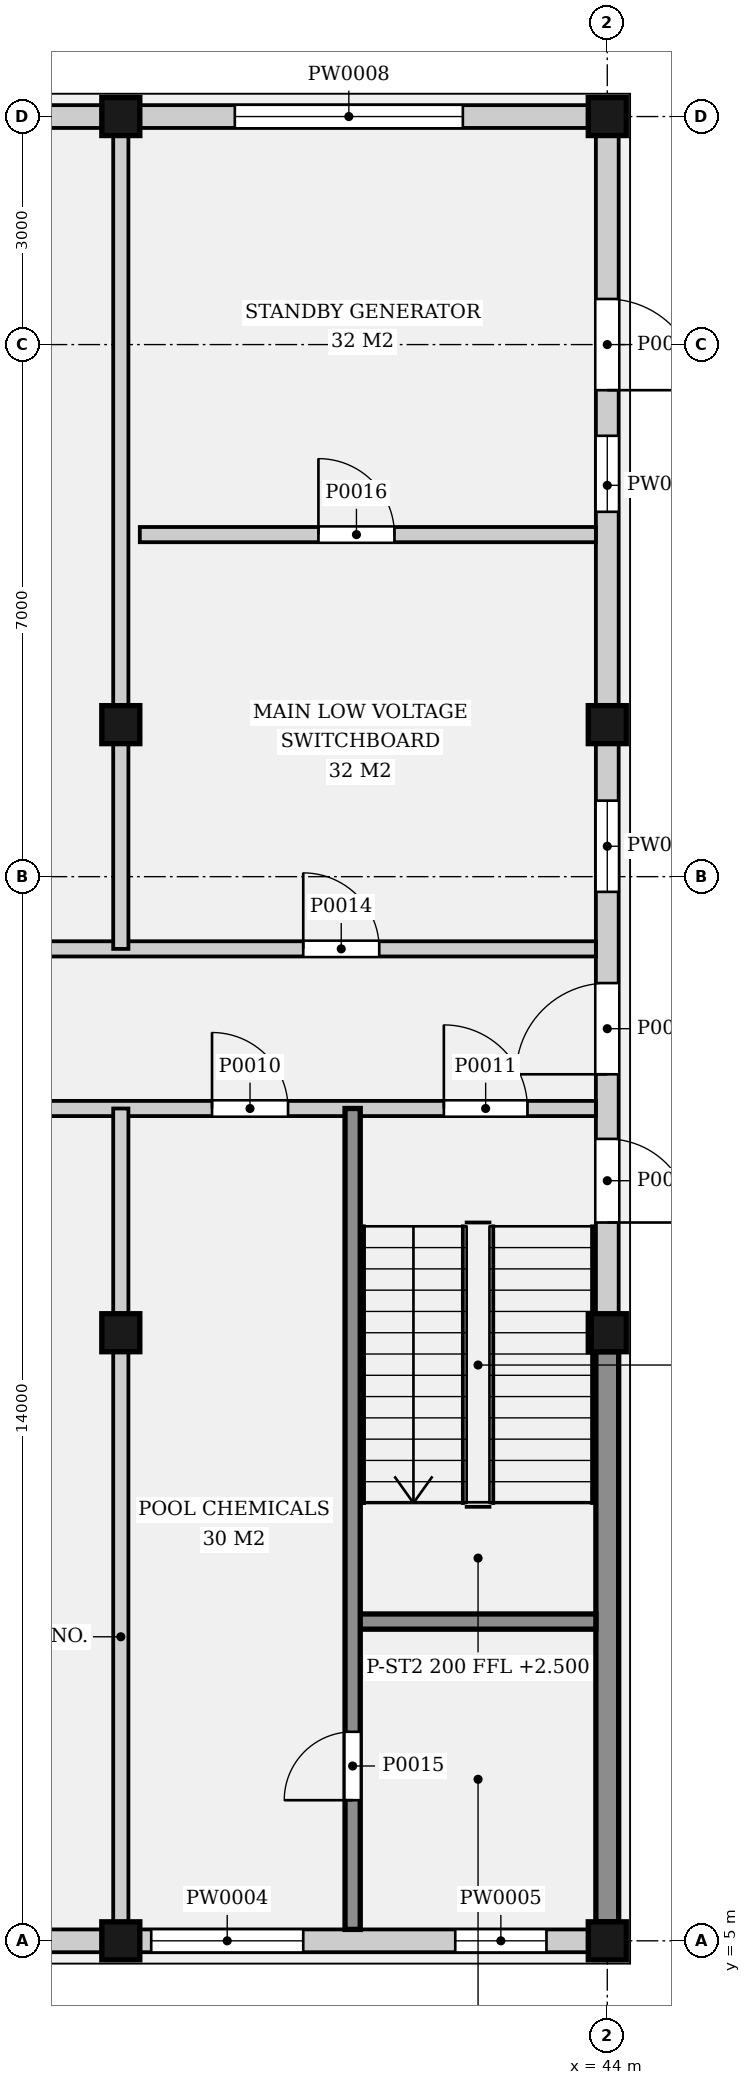
"""IFC4 building model, lengths in metres.
Left out: names, types, materials, properties, quantities, classifications, styles, units other than length and angle.
Written with IfcOpenShell. Run it as: python <this file> out.ifc"""

import sys

from ifc_helpers import new_model, si_unit, direction, frame, frame_2d, origin, origin_2d, place, context, subcontext, project, spatial, rectangle, extrude, element, fill, save


model = new_model("IFC4")
c1 = context("Model", 3, precision=1e-05, world=origin(), true_north=direction((0.0, 1.0)))
c2 = subcontext(c1, "Body", "Model", "MODEL_VIEW")
j1 = project(units=[si_unit("LENGTHUNIT", "METRE"), si_unit("PLANEANGLEUNIT", "RADIAN")], contexts=[c1])
p1 = place(None, origin())
s1 = spatial("IfcSite", under=j1, at=p1, CompositionType="ELEMENT")
p2 = place(p1, origin())
s2 = spatial("IfcBuilding", under=s1, at=p2, CompositionType="ELEMENT")
p3 = place(p2, origin())
s3 = spatial("IfcBuildingStorey", under=s2, at=p3, CompositionType="ELEMENT", Elevation=0.0)
for number, where, z_axis, x_axis in (
    (1, (37.6, 5.0, -0.25), (0.0, 0.0, 1.0), (1.0, 0.0, 0.0)),
    (2, (37.6, 13.0, -0.25), (0.0, 0.0, 1.0), (1.0, 0.0, 0.0)),
    (3, (37.6, 21.0, -0.25), (0.0, 0.0, 1.0), (1.0, 0.0, 0.0)),
    (4, (37.6, 29.0, -0.25), (0.0, 0.0, 1.0), (1.0, 0.0, 0.0)),
    (5, (44.0, 5.0, -0.25), (0.0, 0.0, 1.0), (1.0, 0.0, 0.0)),
    (6, (44.0, 13.0, -0.25), (0.0, 0.0, 1.0), (1.0, 0.0, 0.0)),
    (7, (44.0, 21.0, -0.25), (0.0, 0.0, 1.0), (1.0, 0.0, 0.0)),
    (8, (44.0, 29.0, -0.25), (0.0, 0.0, 1.0), (1.0, 0.0, 0.0)),
):
    element("IfcColumn", number, at=place(p3, frame(where, z_axis=z_axis, x_axis=x_axis)), inside=s3, PredefinedType="COLUMN", context=c2, shape_type="SweptSolid", body=[
        extrude(rectangle(XDim=0.5, YDim=0.5, at=origin_2d()), origin(), (0.0, 0.0, 1.0), 5.25),
    ])
p4 = place(p3, frame((31.45, 5.0, 0.0), z_axis=(0.0, 0.0, 1.0), x_axis=(1.0, 0.0, 0.0)))
e9 = element("IfcWall", 9, at=p4, inside=s3, PredefinedType="SOLIDWALL", context=c2, shape_type="SweptSolid", body=[
    extrude(rectangle(XDim=5.9, YDim=0.3, at=frame_2d((2.95, 0.0))), origin(), (0.0, 0.0, 1.0), 4.64),
])
p5 = place(p4, frame((1.25, 0.0, 0.6)))
e10 = element("IfcOpeningElement", 10, at=p5, cuts=e9, PredefinedType="OPENING", context=c2, shape_type="SweptSolid", body=[
    extrude(rectangle(XDim=3.4, YDim=2.8, at=frame_2d((1.7, 1.4))), frame((0.0, 0.16, 0.0), z_axis=(0.0, -1.0, 0.0), x_axis=(1.0, 0.0, 0.0)), (0.0, 0.0, 1.0), 0.32),
])
p6 = place(p3, frame((37.85, 5.0, 0.0), z_axis=(0.0, 0.0, 1.0), x_axis=(1.0, 0.0, 0.0)))
e11 = element("IfcWall", 11, at=p6, inside=s3, PredefinedType="SOLIDWALL", context=c2, shape_type="SweptSolid", body=[
    extrude(rectangle(XDim=5.9, YDim=0.3, at=frame_2d((2.95, 0.0))), origin(), (0.0, 0.0, 1.0), 4.64),
])
p7 = place(p6, frame((0.15, 0.0, 0.9)))
e12 = element("IfcOpeningElement", 12, at=p7, cuts=e11, PredefinedType="OPENING", context=c2, shape_type="SweptSolid", body=[
    extrude(rectangle(XDim=2.0, YDim=2.4, at=frame_2d((1.0, 1.2))), frame((0.0, 0.16, 0.0), z_axis=(0.0, -1.0, 0.0), x_axis=(1.0, 0.0, 0.0)), (0.0, 0.0, 1.0), 0.32),
])
p8 = place(p6, frame((4.15, 0.0, 0.9)))
e13 = element("IfcOpeningElement", 13, at=p8, cuts=e11, PredefinedType="OPENING", context=c2, shape_type="SweptSolid", body=[
    extrude(rectangle(XDim=1.2, YDim=2.4, at=frame_2d((0.6, 1.2))), frame((0.0, 0.16, 0.0), z_axis=(0.0, -1.0, 0.0), x_axis=(1.0, 0.0, 0.0)), (0.0, 0.0, 1.0), 0.32),
])
p9 = place(p3, frame((31.45, 29.0, 0.0), z_axis=(0.0, 0.0, 1.0), x_axis=(1.0, 0.0, 0.0)))
e14 = element("IfcWall", 14, at=p9, inside=s3, PredefinedType="SOLIDWALL", context=c2, shape_type="SweptSolid", body=[
    extrude(rectangle(XDim=5.9, YDim=0.3, at=frame_2d((2.95, 0.0))), origin(), (0.0, 0.0, 1.0), 4.64),
])
p10 = place(p9, frame((1.25, 0.0, 0.6)))
e15 = element("IfcOpeningElement", 15, at=p10, cuts=e14, PredefinedType="OPENING", context=c2, shape_type="SweptSolid", body=[
    extrude(rectangle(XDim=3.4, YDim=2.8, at=frame_2d((1.7, 1.4))), frame((0.0, 0.16, 0.0), z_axis=(0.0, -1.0, 0.0), x_axis=(1.0, 0.0, 0.0)), (0.0, 0.0, 1.0), 0.32),
])
p11 = place(p3, frame((37.85, 29.0, 0.0), z_axis=(0.0, 0.0, 1.0), x_axis=(1.0, 0.0, 0.0)))
e16 = element("IfcWall", 16, at=p11, inside=s3, PredefinedType="SOLIDWALL", context=c2, shape_type="SweptSolid", body=[
    extrude(rectangle(XDim=5.9, YDim=0.3, at=frame_2d((2.95, 0.0))), origin(), (0.0, 0.0, 1.0), 4.64),
])
p12 = place(p11, frame((1.25, 0.0, 0.6)))
e17 = element("IfcOpeningElement", 17, at=p12, cuts=e16, PredefinedType="OPENING", context=c2, shape_type="SweptSolid", body=[
    extrude(rectangle(XDim=3.0, YDim=2.8, at=frame_2d((1.5, 1.4))), frame((0.0, 0.16, 0.0), z_axis=(0.0, -1.0, 0.0), x_axis=(1.0, 0.0, 0.0)), (0.0, 0.0, 1.0), 0.32),
])
p13 = place(p3, frame((44.0, 5.25, 0.0), z_axis=(0.0, 0.0, 1.0), x_axis=(0.0, 1.0, 0.0)))
e18 = element("IfcWall", 18, at=p13, inside=s3, PredefinedType="SOLIDWALL", context=c2, shape_type="SweptSolid", body=[
    extrude(rectangle(XDim=7.5, YDim=0.3, at=frame_2d((3.75, 0.0))), origin(), (0.0, 0.0, 1.0), 4.64),
])
p14 = place(p3, frame((44.0, 13.25, 0.0), z_axis=(0.0, 0.0, 1.0), x_axis=(0.0, 1.0, 0.0)))
e19 = element("IfcWall", 19, at=p14, inside=s3, PredefinedType="SOLIDWALL", context=c2, shape_type="SweptSolid", body=[
    extrude(rectangle(XDim=7.5, YDim=0.3, at=frame_2d((3.75, 0.0))), origin(), (0.0, 0.0, 1.0), 4.64),
])
p15 = place(p14, frame((3.15, 0.0, 0.0)))
e20 = element("IfcOpeningElement", 20, at=p15, cuts=e19, PredefinedType="OPENING", context=c2, shape_type="SweptSolid", body=[
    extrude(rectangle(XDim=1.2, YDim=2.1, at=frame_2d((0.6, 1.05))), frame((0.0, 0.16, 0.0), z_axis=(0.0, -1.0, 0.0), x_axis=(1.0, 0.0, 0.0)), (0.0, 0.0, 1.0), 0.32),
])
p16 = place(p14, frame((2.3, 0.0, 0.0), z_axis=(0.0, 0.0, 1.0), x_axis=(-1.0, 0.0, 0.0)))
e21 = element("IfcOpeningElement", 21, at=p16, cuts=e19, PredefinedType="OPENING", context=c2, shape_type="SweptSolid", body=[
    extrude(rectangle(XDim=1.1, YDim=2.1, at=frame_2d((0.55, 1.05))), frame((0.0, 0.16, 0.0), z_axis=(0.0, -1.0, 0.0), x_axis=(1.0, 0.0, 0.0)), (0.0, 0.0, 1.0), 0.32),
])
p17 = place(p14, frame((5.55, 0.0, 0.9)))
e22 = element("IfcOpeningElement", 22, at=p17, cuts=e19, PredefinedType="OPENING", context=c2, shape_type="SweptSolid", body=[
    extrude(rectangle(XDim=1.2, YDim=2.4, at=frame_2d((0.6, 1.2))), frame((0.0, 0.16, 0.0), z_axis=(0.0, -1.0, 0.0), x_axis=(1.0, 0.0, 0.0)), (0.0, 0.0, 1.0), 0.32),
])
p18 = place(p3, frame((44.0, 21.25, 0.0), z_axis=(0.0, 0.0, 1.0), x_axis=(0.0, 1.0, 0.0)))
e23 = element("IfcWall", 23, at=p18, inside=s3, PredefinedType="SOLIDWALL", context=c2, shape_type="SweptSolid", body=[
    extrude(rectangle(XDim=7.5, YDim=0.3, at=frame_2d((3.75, 0.0))), origin(), (0.0, 0.0, 1.0), 4.64),
])
p19 = place(p18, frame((5.35, 0.0, 0.0), z_axis=(0.0, 0.0, 1.0), x_axis=(-1.0, 0.0, 0.0)))
e24 = element("IfcOpeningElement", 24, at=p19, cuts=e23, PredefinedType="OPENING", context=c2, shape_type="SweptSolid", body=[
    extrude(rectangle(XDim=1.2, YDim=2.4, at=frame_2d((0.6, 1.2))), frame((0.0, 0.16, 0.0), z_axis=(0.0, -1.0, 0.0), x_axis=(1.0, 0.0, 0.0)), (0.0, 0.0, 1.0), 0.32),
])
p20 = place(p18, frame((2.55, 0.0, 0.9)))
e25 = element("IfcOpeningElement", 25, at=p20, cuts=e23, PredefinedType="OPENING", context=c2, shape_type="SweptSolid", body=[
    extrude(rectangle(XDim=1.0, YDim=2.4, at=frame_2d((0.5, 1.2))), frame((0.0, 0.16, 0.0), z_axis=(0.0, -1.0, 0.0), x_axis=(1.0, 0.0, 0.0)), (0.0, 0.0, 1.0), 0.32),
])
p21 = place(p3, frame((12.15, 15.95, 0.0), z_axis=(0.0, 0.0, 1.0), x_axis=(1.0, 0.0, 0.0)))
e26 = element("IfcWall", 26, at=p21, inside=s3, PredefinedType="PARTITIONING", context=c2, shape_type="SweptSolid", body=[
    extrude(rectangle(XDim=31.7, YDim=0.2, at=frame_2d((15.85, 0.0))), origin(), (0.0, 0.0, 1.0), 4.64),
])
p22 = place(p21, frame((0.9, 0.0, 0.0)))
e27 = element("IfcOpeningElement", 27, at=p22, cuts=e26, PredefinedType="OPENING", context=c2, shape_type="SweptSolid", body=[
    extrude(rectangle(XDim=0.9, YDim=2.1, at=frame_2d((0.45, 1.05))), frame((0.0, 0.11, 0.0), z_axis=(0.0, -1.0, 0.0), x_axis=(1.0, 0.0, 0.0)), (0.0, 0.0, 1.0), 0.22),
])
p23 = place(p21, frame((6.85, 0.0, 0.0)))
e28 = element("IfcOpeningElement", 28, at=p23, cuts=e26, PredefinedType="OPENING", context=c2, shape_type="SweptSolid", body=[
    extrude(rectangle(XDim=1.0, YDim=2.1, at=frame_2d((0.5, 1.05))), frame((0.0, 0.11, 0.0), z_axis=(0.0, -1.0, 0.0), x_axis=(1.0, 0.0, 0.0)), (0.0, 0.0, 1.0), 0.22),
])
p24 = place(p21, frame((17.95, 0.0, 0.0)))
e29 = element("IfcOpeningElement", 29, at=p24, cuts=e26, PredefinedType="OPENING", context=c2, shape_type="SweptSolid", body=[
    extrude(rectangle(XDim=1.8, YDim=2.4, at=frame_2d((0.9, 1.2))), frame((0.0, 0.11, 0.0), z_axis=(0.0, -1.0, 0.0), x_axis=(1.0, 0.0, 0.0)), (0.0, 0.0, 1.0), 0.22),
])
p25 = place(p21, frame((26.65, 0.0, 0.0)))
e30 = element("IfcOpeningElement", 30, at=p25, cuts=e26, PredefinedType="OPENING", context=c2, shape_type="SweptSolid", body=[
    extrude(rectangle(XDim=1.0, YDim=2.1, at=frame_2d((0.5, 1.05))), frame((0.0, 0.11, 0.0), z_axis=(0.0, -1.0, 0.0), x_axis=(1.0, 0.0, 0.0)), (0.0, 0.0, 1.0), 0.22),
])
p26 = place(p21, frame((29.7, 0.0, 0.0)))
e31 = element("IfcOpeningElement", 31, at=p26, cuts=e26, PredefinedType="OPENING", context=c2, shape_type="SweptSolid", body=[
    extrude(rectangle(XDim=1.1, YDim=2.1, at=frame_2d((0.55, 1.05))), frame((0.0, 0.11, 0.0), z_axis=(0.0, -1.0, 0.0), x_axis=(1.0, 0.0, 0.0)), (0.0, 0.0, 1.0), 0.22),
])
p27 = place(p3, frame((12.15, 18.05, 0.0), z_axis=(0.0, 0.0, 1.0), x_axis=(1.0, 0.0, 0.0)))
e32 = element("IfcWall", 32, at=p27, inside=s3, PredefinedType="PARTITIONING", context=c2, shape_type="SweptSolid", body=[
    extrude(rectangle(XDim=31.7, YDim=0.2, at=frame_2d((15.85, 0.0))), origin(), (0.0, 0.0, 1.0), 4.64),
])
p28 = place(p27, frame((3.95, 0.0, 0.0)))
e33 = element("IfcOpeningElement", 33, at=p28, cuts=e32, PredefinedType="OPENING", context=c2, shape_type="SweptSolid", body=[
    extrude(rectangle(XDim=1.8, YDim=2.4, at=frame_2d((0.9, 1.2))), frame((0.0, 0.11, 0.0), z_axis=(0.0, -1.0, 0.0), x_axis=(1.0, 0.0, 0.0)), (0.0, 0.0, 1.0), 0.22),
])
p29 = place(p27, frame((17.95, 0.0, 0.0)))
e34 = element("IfcOpeningElement", 34, at=p29, cuts=e32, PredefinedType="OPENING", context=c2, shape_type="SweptSolid", body=[
    extrude(rectangle(XDim=1.8, YDim=2.4, at=frame_2d((0.9, 1.2))), frame((0.0, 0.11, 0.0), z_axis=(0.0, -1.0, 0.0), x_axis=(1.0, 0.0, 0.0)), (0.0, 0.0, 1.0), 0.22),
])
p30 = place(p27, frame((27.85, 0.0, 0.0)))
e35 = element("IfcOpeningElement", 35, at=p30, cuts=e32, PredefinedType="OPENING", context=c2, shape_type="SweptSolid", body=[
    extrude(rectangle(XDim=1.0, YDim=2.1, at=frame_2d((0.5, 1.05))), frame((0.0, 0.11, 0.0), z_axis=(0.0, -1.0, 0.0), x_axis=(1.0, 0.0, 0.0)), (0.0, 0.0, 1.0), 0.22),
])
p31 = place(p3, frame((37.85, 23.5, 0.0), z_axis=(0.0, 0.0, 1.0), x_axis=(1.0, 0.0, 0.0)))
e36 = element("IfcWall", 36, at=p31, inside=s3, PredefinedType="PARTITIONING", context=c2, shape_type="SweptSolid", body=[
    extrude(rectangle(XDim=6.0, YDim=0.2, at=frame_2d((3.0, 0.0))), origin(), (0.0, 0.0, 1.0), 4.64),
])
p32 = place(p31, frame((2.35, 0.0, 0.0)))
e37 = element("IfcOpeningElement", 37, at=p32, cuts=e36, PredefinedType="OPENING", context=c2, shape_type="SweptSolid", body=[
    extrude(rectangle(XDim=1.0, YDim=2.1, at=frame_2d((0.5, 1.05))), frame((0.0, 0.11, 0.0), z_axis=(0.0, -1.0, 0.0), x_axis=(1.0, 0.0, 0.0)), (0.0, 0.0, 1.0), 0.22),
])
p33 = place(p3, frame((37.6, 5.25, 0.0), z_axis=(0.0, 0.0, 1.0), x_axis=(0.0, 1.0, 0.0)))
e38 = element("IfcWall", 38, at=p33, inside=s3, PredefinedType="PARTITIONING", context=c2, shape_type="SweptSolid", body=[
    extrude(rectangle(XDim=7.5, YDim=0.2, at=frame_2d((3.75, 0.0))), origin(), (0.0, 0.0, 1.0), 4.64),
])
p34 = place(p3, frame((37.6, 13.25, 0.0), z_axis=(0.0, 0.0, 1.0), x_axis=(0.0, 1.0, 0.0)))
e39 = element("IfcWall", 39, at=p34, inside=s3, PredefinedType="PARTITIONING", context=c2, shape_type="SweptSolid", body=[
    extrude(rectangle(XDim=2.7, YDim=0.2, at=frame_2d((1.35, 0.0))), origin(), (0.0, 0.0, 1.0), 4.64),
])
p35 = place(p3, frame((40.65, 5.15, 0.0), z_axis=(0.0, 0.0, 1.0), x_axis=(0.0, 1.0, 0.0)))
e40 = element("IfcWall", 40, at=p35, inside=s3, PredefinedType="SOLIDWALL", context=c2, shape_type="SweptSolid", body=[
    extrude(rectangle(XDim=10.8, YDim=0.2, at=frame_2d((5.4, 0.0))), origin(), (0.0, 0.0, 1.0), 4.64),
])
p36 = place(p35, frame((1.7, 0.0, 0.0)))
e41 = element("IfcOpeningElement", 41, at=p36, cuts=e40, PredefinedType="OPENING", context=c2, shape_type="SweptSolid", body=[
    extrude(rectangle(XDim=0.9, YDim=2.1, at=frame_2d((0.45, 1.05))), frame((0.0, 0.11, 0.0), z_axis=(0.0, -1.0, 0.0), x_axis=(1.0, 0.0, 0.0)), (0.0, 0.0, 1.0), 0.22),
])
p37 = place(p3, frame((37.6, 18.05, 0.0), z_axis=(0.0, 0.0, 1.0), x_axis=(0.0, 1.0, 0.0)))
e42 = element("IfcWall", 42, at=p37, inside=s3, PredefinedType="PARTITIONING", context=c2, shape_type="SweptSolid", body=[
    extrude(rectangle(XDim=2.7, YDim=0.2, at=frame_2d((1.35, 0.0))), origin(), (0.0, 0.0, 1.0), 4.64),
])
p38 = place(p3, frame((37.6, 21.25, 0.0), z_axis=(0.0, 0.0, 1.0), x_axis=(0.0, 1.0, 0.0)))
e43 = element("IfcWall", 43, at=p38, inside=s3, PredefinedType="PARTITIONING", context=c2, shape_type="SweptSolid", body=[
    extrude(rectangle(XDim=7.5, YDim=0.2, at=frame_2d((3.75, 0.0))), origin(), (0.0, 0.0, 1.0), 4.64),
])
p39 = place(p3, frame((40.65, 9.2, 0.0), z_axis=(0.0, 0.0, 1.0), x_axis=(1.0, 0.0, 0.0)))
e44 = element("IfcWall", 44, at=p39, inside=s3, PredefinedType="SOLIDWALL", context=c2, shape_type="SweptSolid", body=[
    extrude(rectangle(XDim=3.2, YDim=0.2, at=frame_2d((1.6, 0.0))), origin(), (0.0, 0.0, 1.0), 4.64),
])
p40 = place(p15, origin())
e45 = element("IfcDoor", 45, at=p40, inside=s3, OperationType="SINGLE_SWING_LEFT", PredefinedType="DOOR", context=c2, shape_type="SweptSolid", body=[
    extrude(rectangle(XDim=1.2, YDim=2.1, at=frame_2d((0.6, 1.05))), frame((0.0, 0.025, 0.0), z_axis=(0.0, -1.0, 0.0), x_axis=(1.0, 0.0, 0.0)), (0.0, 0.0, 1.0), 0.05),
])
fill(e20, e45)
p41 = place(p16, origin())
e46 = element("IfcDoor", 46, at=p41, inside=s3, OperationType="SINGLE_SWING_LEFT", PredefinedType="DOOR", context=c2, shape_type="SweptSolid", body=[
    extrude(rectangle(XDim=1.1, YDim=2.1, at=frame_2d((0.55, 1.05))), frame((0.0, 0.025, 0.0), z_axis=(0.0, -1.0, 0.0), x_axis=(1.0, 0.0, 0.0)), (0.0, 0.0, 1.0), 0.05),
])
fill(e21, e46)
p42 = place(p19, origin())
e47 = element("IfcDoor", 47, at=p42, inside=s3, OperationType="SINGLE_SWING_LEFT", PredefinedType="DOOR", context=c2, shape_type="SweptSolid", body=[
    extrude(rectangle(XDim=1.2, YDim=2.4, at=frame_2d((0.6, 1.2))), frame((0.0, 0.025, 0.0), z_axis=(0.0, -1.0, 0.0), x_axis=(1.0, 0.0, 0.0)), (0.0, 0.0, 1.0), 0.05),
])
fill(e24, e47)
p43 = place(p7, origin())
e48 = element("IfcWindow", 48, at=p43, inside=s3, PartitioningType="SINGLE_PANEL", PredefinedType="USERDEFINED", context=c2, shape_type="SweptSolid", body=[
    extrude(rectangle(XDim=2.0, YDim=2.4, at=frame_2d((1.0, 1.2))), frame((0.0, 0.03, 0.0), z_axis=(0.0, -1.0, 0.0), x_axis=(1.0, 0.0, 0.0)), (0.0, 0.0, 1.0), 0.06),
])
fill(e12, e48)
p44 = place(p8, origin())
e49 = element("IfcWindow", 49, at=p44, inside=s3, PartitioningType="SINGLE_PANEL", PredefinedType="USERDEFINED", context=c2, shape_type="SweptSolid", body=[
    extrude(rectangle(XDim=1.2, YDim=2.4, at=frame_2d((0.6, 1.2))), frame((0.0, 0.03, 0.0), z_axis=(0.0, -1.0, 0.0), x_axis=(1.0, 0.0, 0.0)), (0.0, 0.0, 1.0), 0.06),
])
fill(e13, e49)
p45 = place(p12, origin())
e50 = element("IfcWindow", 50, at=p45, inside=s3, PartitioningType="SINGLE_PANEL", PredefinedType="USERDEFINED", context=c2, shape_type="SweptSolid", body=[
    extrude(rectangle(XDim=3.0, YDim=2.8, at=frame_2d((1.5, 1.4))), frame((0.0, 0.03, 0.0), z_axis=(0.0, -1.0, 0.0), x_axis=(1.0, 0.0, 0.0)), (0.0, 0.0, 1.0), 0.06),
])
fill(e17, e50)
p46 = place(p17, origin())
e51 = element("IfcWindow", 51, at=p46, inside=s3, PartitioningType="SINGLE_PANEL", PredefinedType="USERDEFINED", context=c2, shape_type="SweptSolid", body=[
    extrude(rectangle(XDim=1.2, YDim=2.4, at=frame_2d((0.6, 1.2))), frame((0.0, 0.03, 0.0), z_axis=(0.0, -1.0, 0.0), x_axis=(1.0, 0.0, 0.0)), (0.0, 0.0, 1.0), 0.06),
])
fill(e22, e51)
p47 = place(p20, origin())
e52 = element("IfcWindow", 52, at=p47, inside=s3, PartitioningType="SINGLE_PANEL", PredefinedType="USERDEFINED", context=c2, shape_type="SweptSolid", body=[
    extrude(rectangle(XDim=1.0, YDim=2.4, at=frame_2d((0.5, 1.2))), frame((0.0, 0.03, 0.0), z_axis=(0.0, -1.0, 0.0), x_axis=(1.0, 0.0, 0.0)), (0.0, 0.0, 1.0), 0.06),
])
fill(e25, e52)
p48 = place(p25, origin())
e53 = element("IfcDoor", 53, at=p48, inside=s3, OperationType="SINGLE_SWING_LEFT", PredefinedType="DOOR", context=c2, shape_type="SweptSolid", body=[
    extrude(rectangle(XDim=1.0, YDim=2.1, at=frame_2d((0.5, 1.05))), frame((0.0, 0.025, 0.0), z_axis=(0.0, -1.0, 0.0), x_axis=(1.0, 0.0, 0.0)), (0.0, 0.0, 1.0), 0.05),
])
fill(e30, e53)
p49 = place(p26, origin())
e54 = element("IfcDoor", 54, at=p49, inside=s3, OperationType="SINGLE_SWING_LEFT", PredefinedType="DOOR", context=c2, shape_type="SweptSolid", body=[
    extrude(rectangle(XDim=1.1, YDim=2.1, at=frame_2d((0.55, 1.05))), frame((0.0, 0.025, 0.0), z_axis=(0.0, -1.0, 0.0), x_axis=(1.0, 0.0, 0.0)), (0.0, 0.0, 1.0), 0.05),
])
fill(e31, e54)
p50 = place(p30, origin())
e55 = element("IfcDoor", 55, at=p50, inside=s3, OperationType="SINGLE_SWING_LEFT", PredefinedType="DOOR", context=c2, shape_type="SweptSolid", body=[
    extrude(rectangle(XDim=1.0, YDim=2.1, at=frame_2d((0.5, 1.05))), frame((0.0, 0.025, 0.0), z_axis=(0.0, -1.0, 0.0), x_axis=(1.0, 0.0, 0.0)), (0.0, 0.0, 1.0), 0.05),
])
fill(e35, e55)
p51 = place(p36, origin())
e56 = element("IfcDoor", 56, at=p51, inside=s3, OperationType="SINGLE_SWING_LEFT", PredefinedType="DOOR", context=c2, shape_type="SweptSolid", body=[
    extrude(rectangle(XDim=0.9, YDim=2.1, at=frame_2d((0.45, 1.05))), frame((0.0, 0.025, 0.0), z_axis=(0.0, -1.0, 0.0), x_axis=(1.0, 0.0, 0.0)), (0.0, 0.0, 1.0), 0.05),
])
fill(e41, e56)
p52 = place(p32, origin())
e57 = element("IfcDoor", 57, at=p52, inside=s3, OperationType="SINGLE_SWING_LEFT", PredefinedType="DOOR", context=c2, shape_type="SweptSolid", body=[
    extrude(rectangle(XDim=1.0, YDim=2.1, at=frame_2d((0.5, 1.05))), frame((0.0, 0.025, 0.0), z_axis=(0.0, -1.0, 0.0), x_axis=(1.0, 0.0, 0.0)), (0.0, 0.0, 1.0), 0.05),
])
fill(e37, e57)
save(model, sys.argv[1])
